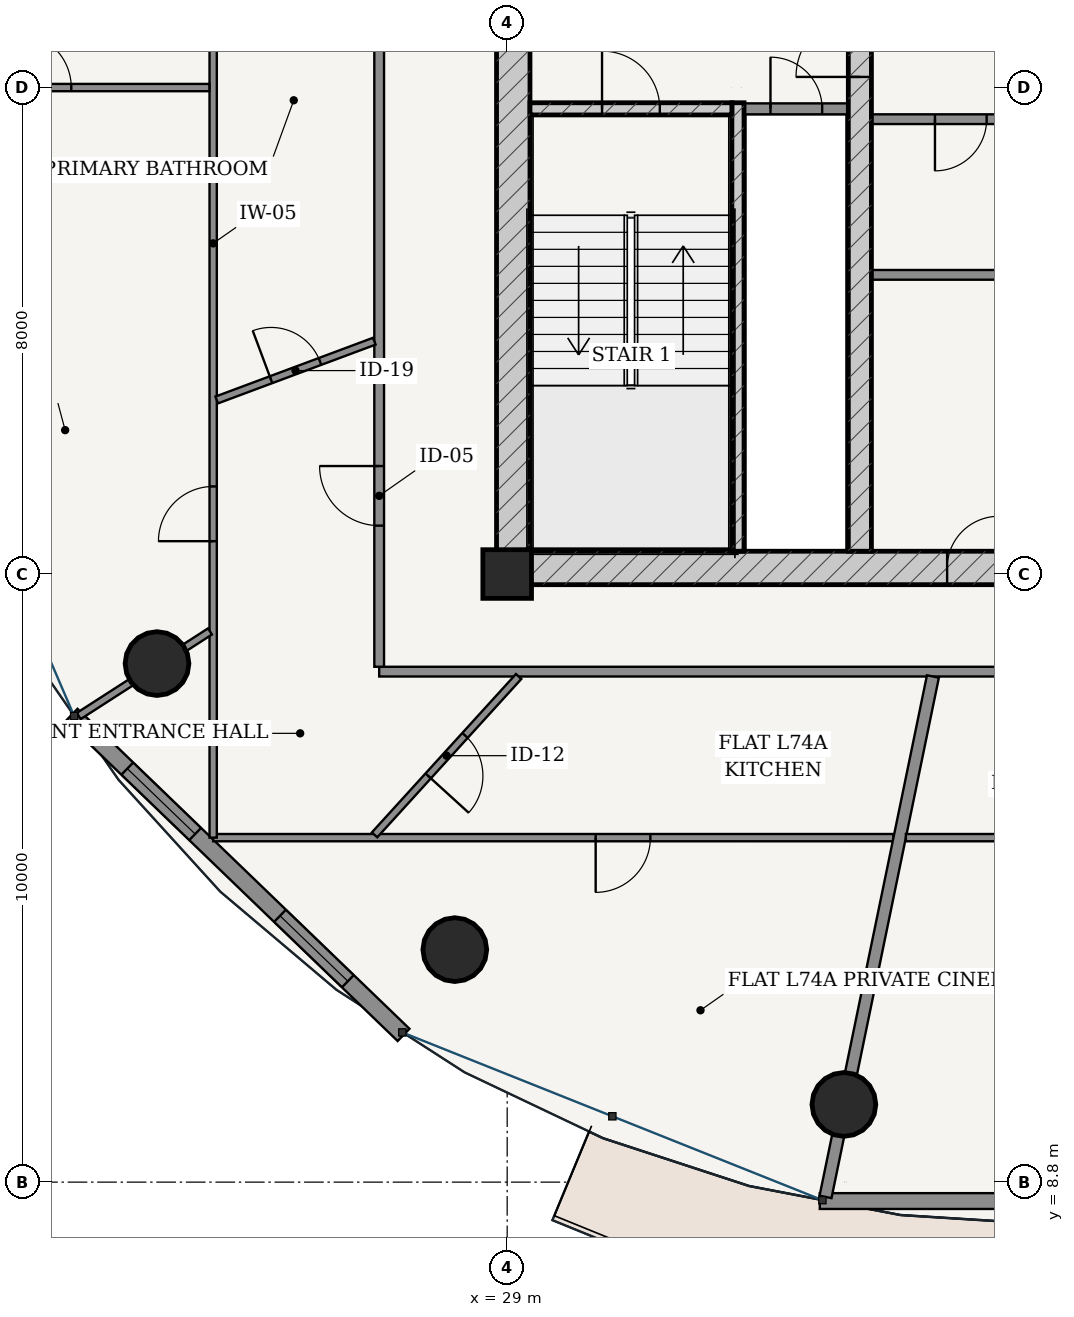
"""IFC4 building model, lengths in metres.
Left out: names, types, materials, properties, quantities, classifications, styles, units other than length and angle.
Written with IfcOpenShell. Run it as: python <this file> out.ifc"""

import sys

from ifc_helpers import new_model, si_unit, direction, frame, frame_2d, origin, origin_2d, place, context, subcontext, project, spatial, rectangle, hollow_circle, extrude, source, transform, mapped, element, fill, save


model = new_model("IFC4")
c1 = context("Model", 3, precision=1e-05, world=origin(), true_north=direction((-0.2419218956, 0.970295726276)))
c2 = subcontext(c1, "Body", "Model", "MODEL_VIEW")
j1 = project(units=[si_unit("LENGTHUNIT", "METRE"), si_unit("PLANEANGLEUNIT", "RADIAN")], contexts=[c1])
p1 = place(None, origin())
s1 = spatial("IfcSite", under=j1, at=p1, CompositionType="ELEMENT")
p2 = place(p1, origin())
s2 = spatial("IfcBuilding", under=s1, at=p2, CompositionType="ELEMENT")
p3 = place(p2, frame((0.0, 0.0, 281.95)))
s3 = spatial("IfcBuildingStorey", under=s2, at=p3, CompositionType="ELEMENT", Elevation=281.95)
p4 = place(p3, frame((29.0, 18.8, 0.0), z_axis=(0.0, 0.0, 1.0), x_axis=(1.0, 0.0, 0.0)))
e1 = element("IfcColumn", 1, at=p4, inside=s3, PredefinedType="COLUMN", context=c2, shape_type="SweptSolid", body=[
    extrude(rectangle(XDim=0.8, YDim=0.8, at=origin_2d()), origin(), (0.0, 0.0, 1.0), 3.75),
])
p5 = place(p3, frame((28.825, 18.9, 0.0), z_axis=(0.0, 0.0, 1.0), x_axis=(1.0, 0.0, 0.0)))
e2 = element("IfcWall", 2, at=p5, inside=s3, PredefinedType="SHEAR", context=c2, shape_type="SweptSolid", body=[
    extrude(rectangle(XDim=18.35, YDim=0.55, at=frame_2d((9.175, 0.0))), origin(), (0.0, 0.0, 1.0), 3.49),
])
p6 = place(p5, frame((7.41, 0.0, 0.0)))
e3 = element("IfcOpeningElement", 3, at=p6, cuts=e2, PredefinedType="OPENING", context=c2, shape_type="SweptSolid", body=[
    extrude(rectangle(XDim=0.85, YDim=2.1, at=frame_2d((0.425, 1.05))), frame((0.0, 0.285, 0.0), z_axis=(0.0, -1.0, 0.0), x_axis=(1.0, 0.0, 0.0)), (0.0, 0.0, 1.0), 0.57),
])
p7 = place(p5, frame((10.49, 0.0, 0.0)))
e4 = element("IfcOpeningElement", 4, at=p7, cuts=e2, PredefinedType="OPENING", context=c2, shape_type="SweptSolid", body=[
    extrude(rectangle(XDim=0.85, YDim=2.1, at=frame_2d((0.425, 1.05))), frame((0.0, 0.285, 0.0), z_axis=(0.0, -1.0, 0.0), x_axis=(1.0, 0.0, 0.0)), (0.0, 0.0, 1.0), 0.57),
])
p8 = place(p3, frame((29.1, 19.175, 0.0), z_axis=(0.0, 0.0, 1.0), x_axis=(0.0, 1.0, 0.0)))
e5 = element("IfcWall", 5, at=p8, inside=s3, PredefinedType="SHEAR", context=c2, shape_type="SweptSolid", body=[
    extrude(rectangle(XDim=15.25, YDim=0.55, at=frame_2d((7.625, 0.0))), origin(), (0.0, 0.0, 1.0), 3.49),
])
p9 = place(p8, frame((9.875, 0.0, 0.0)))
e6 = element("IfcOpeningElement", 6, at=p9, cuts=e5, PredefinedType="OPENING", context=c2, shape_type="SweptSolid", body=[
    extrude(rectangle(XDim=1.5, YDim=2.2, at=frame_2d((0.75, 1.1))), frame((0.0, 0.285, 0.0), z_axis=(0.0, -1.0, 0.0), x_axis=(1.0, 0.0, 0.0)), (0.0, 0.0, 1.0), 0.57),
])
p10 = place(p3, frame((32.795, 19.175, 0.0), z_axis=(0.0, 0.0, 1.0), x_axis=(0.0, 1.0, 0.0)))
e7 = element("IfcWall", 7, at=p10, inside=s3, PredefinedType="SOLIDWALL", context=c2, shape_type="SweptSolid", body=[
    extrude(rectangle(XDim=7.375, YDim=0.2, at=frame_2d((3.688, 0.0))), origin(), (0.0, 0.0, 1.0), 3.49),
])
p11 = place(p3, frame((29.375, 26.45, 0.0), z_axis=(0.0, 0.0, 1.0), x_axis=(1.0, 0.0, 0.0)))
e8 = element("IfcWall", 8, at=p11, inside=s3, PredefinedType="SOLIDWALL", context=c2, shape_type="SweptSolid", body=[
    extrude(rectangle(XDim=3.32, YDim=0.2, at=frame_2d((1.66, 0.0))), origin(), (0.0, 0.0, 1.0), 3.49),
])
p12 = place(p11, frame((1.185, 0.0, 0.0)))
e9 = element("IfcOpeningElement", 9, at=p12, cuts=e8, PredefinedType="OPENING", context=c2, shape_type="SweptSolid", body=[
    extrude(rectangle(XDim=0.95, YDim=2.15, at=frame_2d((0.475, 1.075))), frame((0.0, 0.11, 0.0), z_axis=(0.0, -1.0, 0.0), x_axis=(1.0, 0.0, 0.0)), (0.0, 0.0, 1.0), 0.22),
])
p13 = place(p3, frame((34.8, 19.175, 0.0), z_axis=(0.0, 0.0, 1.0), x_axis=(0.0, 1.0, 0.0)))
e10 = element("IfcWall", 10, at=p13, inside=s3, PredefinedType="SHEAR", context=c2, shape_type="SweptSolid", body=[
    extrude(rectangle(XDim=15.25, YDim=0.38, at=frame_2d((7.625, 0.0))), origin(), (0.0, 0.0, 1.0), 3.49),
])
p14 = place(p13, frame((7.8, 0.0, 0.0)))
e11 = element("IfcOpeningElement", 11, at=p14, cuts=e10, PredefinedType="OPENING", context=c2, shape_type="SweptSolid", body=[
    extrude(rectangle(XDim=1.05, YDim=2.15, at=frame_2d((0.525, 1.075))), frame((0.0, 0.2, 0.0), z_axis=(0.0, -1.0, 0.0), x_axis=(1.0, 0.0, 0.0)), (0.0, 0.0, 1.0), 0.4),
])
for number, where, z_axis, x_axis in (
    (12, (23.241, 17.328, 0.0), (0.0, 0.0, 1.0), (1.0, 0.0, 0.0)),
    (13, (28.139, 12.624, 0.0), (0.0, 0.0, 1.0), (1.0, 0.0, 0.0)),
    (14, (34.537, 10.078, 0.0), (0.0, 0.0, 1.0), (1.0, 0.0, 0.0)),
):
    element("IfcColumn", number, at=place(p3, frame(where, z_axis=z_axis, x_axis=x_axis)), inside=s3, PredefinedType="COLUMN", context=c2, shape_type="SweptSolid", body=[
        extrude(hollow_circle(Radius=0.525, WallThickness=0.035, at=origin_2d()), origin(), (0.0, 0.0, 1.0), 3.75),
    ])
p15 = place(p3, frame((21.837, 16.483, 0.0), z_axis=(0.0, 0.0, 1.0), x_axis=(0.719995397366, -0.69397883813, 0.0)))
e15 = element("IfcWall", 15, at=p15, inside=s3, PredefinedType="SOLIDWALL", context=c2, shape_type="SweptSolid", body=[
    extrude(rectangle(XDim=7.582, YDim=0.28, at=frame_2d((3.791, 0.0))), origin(), (0.0, 0.0, 1.0), 3.49),
])
p16 = place(p15, frame((1.272, 0.0, 0.85)))
e16 = element("IfcOpeningElement", 16, at=p16, cuts=e15, PredefinedType="OPENING", context=c2, shape_type="SweptSolid", body=[
    extrude(rectangle(XDim=1.55, YDim=1.95, at=frame_2d((0.775, 0.975))), frame((0.0, 0.15, 0.0), z_axis=(0.0, -1.0, 0.0), x_axis=(1.0, 0.0, 0.0)), (0.0, 0.0, 1.0), 0.3),
])
p17 = place(p15, frame((4.76, 0.0, 0.85)))
e17 = element("IfcOpeningElement", 17, at=p17, cuts=e15, PredefinedType="OPENING", context=c2, shape_type="SweptSolid", body=[
    extrude(rectangle(XDim=1.55, YDim=1.95, at=frame_2d((0.775, 0.975))), frame((0.0, 0.15, 0.0), z_axis=(0.0, -1.0, 0.0), x_axis=(1.0, 0.0, 0.0)), (0.0, 0.0, 1.0), 0.3),
])
p18 = place(p3, frame((34.141, 8.489, 0.0), z_axis=(0.0, 0.0, 1.0), x_axis=(1.0, 0.0, 0.0)))
e18 = element("IfcWall", 18, at=p18, inside=s3, PredefinedType="SOLIDWALL", context=c2, shape_type="SweptSolid", body=[
    extrude(rectangle(XDim=7.718, YDim=0.26, at=frame_2d((3.859, 0.0))), origin(), (0.0, 0.0, 1.0), 3.49),
])
p19 = place(p18, frame((3.184, 0.0, 0.0)))
e19 = element("IfcOpeningElement", 19, at=p19, cuts=e18, PredefinedType="OPENING", context=c2, shape_type="SweptSolid", body=[
    extrude(rectangle(XDim=1.35, YDim=2.2, at=frame_2d((0.675, 1.1))), frame((0.0, 0.14, 0.0), z_axis=(0.0, -1.0, 0.0), x_axis=(1.0, 0.0, 0.0)), (0.0, 0.0, 1.0), 0.28),
])
p20 = place(p3, frame((32.9, 26.45, 0.0), z_axis=(0.0, 0.0, 1.0), x_axis=(1.0, 0.0, 0.0)))
e20 = element("IfcWall", 20, at=p20, inside=s3, PredefinedType="PARTITIONING", context=c2, shape_type="SweptSolid", body=[
    extrude(rectangle(XDim=1.71, YDim=0.18, at=frame_2d((0.855, 0.0))), origin(), (0.0, 0.0, 1.0), 3.49),
])
p21 = place(p20, frame((0.43, 0.0, 0.0)))
e21 = element("IfcOpeningElement", 21, at=p21, cuts=e20, PredefinedType="OPENING", context=c2, shape_type="SweptSolid", body=[
    extrude(rectangle(XDim=0.85, YDim=2.1, at=frame_2d((0.425, 1.05))), frame((0.0, 0.1, 0.0), z_axis=(0.0, -1.0, 0.0), x_axis=(1.0, 0.0, 0.0)), (0.0, 0.0, 1.0), 0.2),
])
p22 = place(p3, frame((34.99, 26.28, 0.0), z_axis=(0.0, 0.0, 1.0), x_axis=(1.0, 0.0, 0.0)))
e22 = element("IfcWall", 22, at=p22, inside=s3, PredefinedType="PARTITIONING", context=c2, shape_type="SweptSolid", body=[
    extrude(rectangle(XDim=6.02, YDim=0.16, at=frame_2d((3.01, 0.0))), origin(), (0.0, 0.0, 1.0), 3.49),
])
p23 = place(p22, frame((1.045, 0.0, 0.0)))
e23 = element("IfcOpeningElement", 23, at=p23, cuts=e22, PredefinedType="OPENING", context=c2, shape_type="SweptSolid", body=[
    extrude(rectangle(XDim=0.85, YDim=2.1, at=frame_2d((0.425, 1.05))), frame((0.0, 0.09, 0.0), z_axis=(0.0, -1.0, 0.0), x_axis=(1.0, 0.0, 0.0)), (0.0, 0.0, 1.0), 0.18),
])
p24 = place(p22, frame((3.215, 0.0, 0.0)))
e24 = element("IfcOpeningElement", 24, at=p24, cuts=e22, PredefinedType="OPENING", context=c2, shape_type="SweptSolid", body=[
    extrude(rectangle(XDim=1.1, YDim=2.2, at=frame_2d((0.55, 1.1))), frame((0.0, 0.09, 0.0), z_axis=(0.0, -1.0, 0.0), x_axis=(1.0, 0.0, 0.0)), (0.0, 0.0, 1.0), 0.18),
])
p25 = place(p22, frame((4.695, 0.0, 0.0)))
e25 = element("IfcOpeningElement", 25, at=p25, cuts=e22, PredefinedType="OPENING", context=c2, shape_type="SweptSolid", body=[
    extrude(rectangle(XDim=1.1, YDim=2.2, at=frame_2d((0.55, 1.1))), frame((0.0, 0.09, 0.0), z_axis=(0.0, -1.0, 0.0), x_axis=(1.0, 0.0, 0.0)), (0.0, 0.0, 1.0), 0.18),
])
p26 = place(p3, frame((34.99, 23.72, 0.0), z_axis=(0.0, 0.0, 1.0), x_axis=(1.0, 0.0, 0.0)))
e26 = element("IfcWall", 26, at=p26, inside=s3, PredefinedType="PARTITIONING", context=c2, shape_type="SweptSolid", body=[
    extrude(rectangle(XDim=6.02, YDim=0.16, at=frame_2d((3.01, 0.0))), origin(), (0.0, 0.0, 1.0), 3.49),
])
p27 = place(p3, frame((26.895, 17.195, 0.0), z_axis=(0.0, 0.0, 1.0), x_axis=(1.0, 0.0, 0.0)))
e27 = element("IfcWall", 27, at=p27, inside=s3, PredefinedType="PARTITIONING", context=c2, shape_type="SweptSolid", body=[
    extrude(rectangle(XDim=22.21, YDim=0.16, at=frame_2d((11.105, 0.0))), origin(), (0.0, 0.0, 1.0), 3.015),
])
p28 = place(p27, frame((17.365, 0.0, 0.0)))
e28 = element("IfcOpeningElement", 28, at=p28, cuts=e27, PredefinedType="OPENING", context=c2, shape_type="SweptSolid", body=[
    extrude(rectangle(XDim=0.98, YDim=2.2, at=frame_2d((0.49, 1.1))), frame((0.0, 0.09, 0.0), z_axis=(0.0, -1.0, 0.0), x_axis=(1.0, 0.0, 0.0)), (0.0, 0.0, 1.0), 0.18),
])
p29 = place(p3, frame((26.895, 17.275, 0.0), z_axis=(0.0, 0.0, 1.0), x_axis=(0.0, 1.0, 0.0)))
e29 = element("IfcWall", 29, at=p29, inside=s3, PredefinedType="PARTITIONING", context=c2, shape_type="SweptSolid", body=[
    extrude(rectangle(XDim=13.925, YDim=0.16, at=frame_2d((6.962, 0.0))), origin(), (0.0, 0.0, 1.0), 3.015),
])
p30 = place(p29, frame((2.321, 0.0, 0.0)))
e30 = element("IfcOpeningElement", 30, at=p30, cuts=e29, PredefinedType="OPENING", context=c2, shape_type="SweptSolid", body=[
    extrude(rectangle(XDim=0.98, YDim=2.2, at=frame_2d((0.49, 1.1))), frame((0.0, 0.09, 0.0), z_axis=(0.0, -1.0, 0.0), x_axis=(1.0, 0.0, 0.0)), (0.0, 0.0, 1.0), 0.18),
])
p31 = place(p3, frame((35.353, 14.465, 0.0), z_axis=(0.0, 0.0, 1.0), x_axis=(-1.0, 0.0, 0.0)))
e31 = element("IfcWall", 31, at=p31, inside=s3, PredefinedType="PARTITIONING", context=c2, shape_type="SweptSolid", body=[
    extrude(rectangle(XDim=11.188, YDim=0.12, at=frame_2d((5.594, 0.0))), origin(), (0.0, 0.0, 1.0), 3.015),
])
p32 = place(p31, frame((3.997, 0.0, 0.0)))
e32 = element("IfcOpeningElement", 32, at=p32, cuts=e31, PredefinedType="OPENING", context=c2, shape_type="SweptSolid", body=[
    extrude(rectangle(XDim=0.9, YDim=2.15, at=frame_2d((0.45, 1.075))), frame((0.0, 0.07, 0.0), z_axis=(0.0, -1.0, 0.0), x_axis=(1.0, 0.0, 0.0)), (0.0, 0.0, 1.0), 0.14),
])
p33 = place(p3, frame((24.165, 14.465, 0.0), z_axis=(0.0, 0.0, 1.0), x_axis=(0.0, 1.0, 0.0)))
e33 = element("IfcWall", 33, at=p33, inside=s3, PredefinedType="PARTITIONING", context=c2, shape_type="SweptSolid", body=[
    extrude(rectangle(XDim=19.545, YDim=0.12, at=frame_2d((9.772, 0.0))), origin(), (0.0, 0.0, 1.0), 3.015),
])
p34 = place(p33, frame((4.875, 0.0, 0.0)))
e34 = element("IfcOpeningElement", 34, at=p34, cuts=e33, PredefinedType="OPENING", context=c2, shape_type="SweptSolid", body=[
    extrude(rectangle(XDim=0.9, YDim=2.15, at=frame_2d((0.45, 1.075))), frame((0.0, 0.07, 0.0), z_axis=(0.0, -1.0, 0.0), x_axis=(1.0, 0.0, 0.0)), (0.0, 0.0, 1.0), 0.14),
])
p35 = place(p33, frame((16.61, 0.0, 0.0)))
e35 = element("IfcOpeningElement", 35, at=p35, cuts=e33, PredefinedType="OPENING", context=c2, shape_type="SweptSolid", body=[
    extrude(rectangle(XDim=0.9, YDim=2.15, at=frame_2d((0.45, 1.075))), frame((0.0, 0.07, 0.0), z_axis=(0.0, -1.0, 0.0), x_axis=(1.0, 0.0, 0.0)), (0.0, 0.0, 1.0), 0.14),
])
p36 = place(p3, frame((24.103, 26.8, 0.0), z_axis=(0.0, 0.0, 1.0), x_axis=(-1.0, 0.0, 0.0)))
e36 = element("IfcWall", 36, at=p36, inside=s3, PredefinedType="PARTITIONING", context=c2, shape_type="SweptSolid", body=[
    extrude(rectangle(XDim=5.443, YDim=0.12, at=frame_2d((2.722, 0.0))), origin(), (0.0, 0.0, 1.0), 3.121),
])
p37 = place(p36, frame((2.271, 0.0, 0.0)))
e37 = element("IfcOpeningElement", 37, at=p37, cuts=e36, PredefinedType="OPENING", context=c2, shape_type="SweptSolid", body=[
    extrude(rectangle(XDim=0.9, YDim=2.15, at=frame_2d((0.45, 1.075))), frame((0.0, 0.07, 0.0), z_axis=(0.0, -1.0, 0.0), x_axis=(1.0, 0.0, 0.0)), (0.0, 0.0, 1.0), 0.14),
])
p38 = place(p3, frame((24.113, 17.856, 0.0), z_axis=(0.0, 0.0, 1.0), x_axis=(-0.840708587197, -0.54148783127, 0.0)))
e38 = element("IfcWall", 38, at=p38, inside=s3, PredefinedType="PARTITIONING", context=c2, shape_type="SweptSolid", body=[
    extrude(rectangle(XDim=2.568, YDim=0.12, at=frame_2d((1.284, 0.0))), origin(), (0.0, 0.0, 1.0), 3.015),
])
p39 = place(p3, frame((26.815, 22.629, 0.0), z_axis=(0.0, 0.0, 1.0), x_axis=(-0.93696600231, -0.349420535338, 0.0)))
e39 = element("IfcWall", 39, at=p39, inside=s3, PredefinedType="PARTITIONING", context=c2, shape_type="SweptSolid", body=[
    extrude(rectangle(XDim=2.766, YDim=0.12, at=frame_2d((1.383, 0.0))), origin(), (0.0, 0.0, 1.0), 3.209),
])
p40 = place(p39, frame((0.953, 0.0, 0.0)))
e40 = element("IfcOpeningElement", 40, at=p40, cuts=e39, PredefinedType="OPENING", context=c2, shape_type="SweptSolid", body=[
    extrude(rectangle(XDim=0.86, YDim=2.15, at=frame_2d((0.43, 1.075))), frame((0.0, 0.07, 0.0), z_axis=(0.0, -1.0, 0.0), x_axis=(1.0, 0.0, 0.0)), (0.0, 0.0, 1.0), 0.14),
])
p41 = place(p3, frame((29.188, 17.115, 0.0), z_axis=(0.0, 0.0, 1.0), x_axis=(-0.67292817107, -0.739707831904, 0.0)))
e41 = element("IfcWall", 41, at=p41, inside=s3, PredefinedType="PARTITIONING", context=c2, shape_type="SweptSolid", body=[
    extrude(rectangle(XDim=3.521, YDim=0.12, at=frame_2d((1.76, 0.0))), origin(), (0.0, 0.0, 1.0), 3.015),
])
p42 = place(p41, frame((1.31, 0.0, 0.0)))
e42 = element("IfcOpeningElement", 42, at=p42, cuts=e41, PredefinedType="OPENING", context=c2, shape_type="SweptSolid", body=[
    extrude(rectangle(XDim=0.9, YDim=2.15, at=frame_2d((0.45, 1.075))), frame((0.0, 0.07, 0.0), z_axis=(0.0, -1.0, 0.0), x_axis=(1.0, 0.0, 0.0)), (0.0, 0.0, 1.0), 0.14),
])
p43 = place(p3, frame((36.001, 17.115, 0.0), z_axis=(0.0, 0.0, 1.0), x_axis=(-0.202108543081, -0.979363128167, 0.0)))
e43 = element("IfcWall", 43, at=p43, inside=s3, PredefinedType="PARTITIONING", context=c2, shape_type="SweptSolid", body=[
    extrude(rectangle(XDim=8.739, YDim=0.2, at=frame_2d((4.369, 0.0))), origin(), (0.0, 0.0, 1.0), 3.015),
])
p44 = place(p3, frame((51.835, 14.465, 0.0), z_axis=(0.0, 0.0, 1.0), x_axis=(-1.0, 0.0, 0.0)))
e44 = element("IfcWall", 44, at=p44, inside=s3, PredefinedType="PARTITIONING", context=c2, shape_type="SweptSolid", body=[
    extrude(rectangle(XDim=16.278, YDim=0.12, at=frame_2d((8.139, 0.0))), origin(), (0.0, 0.0, 1.0), 3.015),
])
p45 = place(p44, frame((4.996, 0.0, 0.0)))
e45 = element("IfcOpeningElement", 45, at=p45, cuts=e44, PredefinedType="OPENING", context=c2, shape_type="SweptSolid", body=[
    extrude(rectangle(XDim=0.9, YDim=2.15, at=frame_2d((0.45, 1.075))), frame((0.0, 0.07, 0.0), z_axis=(0.0, -1.0, 0.0), x_axis=(1.0, 0.0, 0.0)), (0.0, 0.0, 1.0), 0.14),
])
m1 = source(origin(), c2, "Body", "SweptSolid", [
    extrude(rectangle(XDim=1.55, YDim=1.95, at=frame_2d((0.775, 0.975))), frame((0.0, 0.03, 0.0), z_axis=(0.0, -1.0, 0.0), x_axis=(1.0, 0.0, 0.0)), (0.0, 0.0, 1.0), 0.06),
])
p46 = place(p16, origin())
e46 = element("IfcWindow", 46, at=p46, inside=s3, PartitioningType="SINGLE_PANEL", PredefinedType="WINDOW", context=c2, shape_type="MappedRepresentation", body=[
    mapped(m1, transform((0.0, 0.0, 0.0), scale=1.0)),
])
fill(e16, e46)
p47 = place(p17, origin())
e47 = element("IfcWindow", 47, at=p47, inside=s3, PartitioningType="SINGLE_PANEL", PredefinedType="WINDOW", context=c2, shape_type="MappedRepresentation", body=[
    mapped(m1, transform((0.0, 0.0, 0.0), scale=1.0)),
])
fill(e17, e47)
m2 = source(origin(), c2, "Body", "SweptSolid", [
    extrude(rectangle(XDim=1.05, YDim=2.15, at=frame_2d((0.525, 1.075))), frame((0.0, 0.025, 0.0), z_axis=(0.0, -1.0, 0.0), x_axis=(1.0, 0.0, 0.0)), (0.0, 0.0, 1.0), 0.05),
])
p48 = place(p14, origin())
e48 = element("IfcDoor", 48, at=p48, inside=s3, OperationType="SINGLE_SWING_LEFT", PredefinedType="DOOR", context=c2, shape_type="MappedRepresentation", body=[
    mapped(m2, transform((0.0, 0.0, 0.0), scale=1.0)),
])
fill(e11, e48)
m3 = source(origin(), c2, "Body", "SweptSolid", [
    extrude(rectangle(XDim=0.95, YDim=2.15, at=frame_2d((0.475, 1.075))), frame((0.0, 0.025, 0.0), z_axis=(0.0, -1.0, 0.0), x_axis=(1.0, 0.0, 0.0)), (0.0, 0.0, 1.0), 0.05),
])
p49 = place(p12, origin())
e49 = element("IfcDoor", 49, at=p49, inside=s3, OperationType="SINGLE_SWING_LEFT", PredefinedType="DOOR", context=c2, shape_type="MappedRepresentation", body=[
    mapped(m3, transform((0.0, 0.0, 0.0), scale=1.0)),
])
fill(e9, e49)
m4 = source(origin(), c2, "Body", "SweptSolid", [
    extrude(rectangle(XDim=0.85, YDim=2.1, at=frame_2d((0.425, 1.05))), frame((0.0, 0.025, 0.0), z_axis=(0.0, -1.0, 0.0), x_axis=(1.0, 0.0, 0.0)), (0.0, 0.0, 1.0), 0.05),
])
p50 = place(p21, origin())
e50 = element("IfcDoor", 50, at=p50, inside=s3, OperationType="SINGLE_SWING_LEFT", PredefinedType="DOOR", context=c2, shape_type="MappedRepresentation", body=[
    mapped(m4, transform((0.0, 0.0, 0.0), scale=1.0)),
])
fill(e21, e50)
p51 = place(p23, frame((0.85, 0.0, 0.0), z_axis=(0.0, 0.0, 1.0), x_axis=(-1.0, 0.0, 0.0)))
e51 = element("IfcDoor", 51, at=p51, inside=s3, OperationType="SINGLE_SWING_RIGHT", PredefinedType="DOOR", context=c2, shape_type="MappedRepresentation", body=[
    mapped(m4, transform((0.0, 0.0, 0.0), scale=1.0)),
])
fill(e23, e51)
p52 = place(p6, origin())
e52 = element("IfcDoor", 52, at=p52, inside=s3, OperationType="SINGLE_SWING_RIGHT", PredefinedType="DOOR", context=c2, shape_type="MappedRepresentation", body=[
    mapped(m4, transform((0.0, 0.0, 0.0), scale=1.0)),
])
fill(e3, e52)
m5 = source(origin(), c2, "Body", "SweptSolid", [
    extrude(rectangle(XDim=0.98, YDim=2.2, at=frame_2d((0.49, 1.1))), frame((0.0, 0.025, 0.0), z_axis=(0.0, -1.0, 0.0), x_axis=(1.0, 0.0, 0.0)), (0.0, 0.0, 1.0), 0.05),
])
p53 = place(p30, origin())
e53 = element("IfcDoor", 53, at=p53, inside=s3, OperationType="SINGLE_SWING_RIGHT", PredefinedType="DOOR", context=c2, shape_type="MappedRepresentation", body=[
    mapped(m5, transform((0.0, 0.0, 0.0), scale=1.0)),
])
fill(e30, e53)
m6 = source(origin(), c2, "Body", "SweptSolid", [
    extrude(rectangle(XDim=0.86, YDim=2.15, at=frame_2d((0.43, 1.075))), frame((0.0, 0.025, 0.0), z_axis=(0.0, -1.0, 0.0), x_axis=(1.0, 0.0, 0.0)), (0.0, 0.0, 1.0), 0.05),
])
p54 = place(p40, frame((0.86, 0.0, 0.0), z_axis=(0.0, 0.0, 1.0), x_axis=(-1.0, 0.0, 0.0)))
e54 = element("IfcDoor", 54, at=p54, inside=s3, OperationType="SINGLE_SWING_LEFT", PredefinedType="DOOR", context=c2, shape_type="MappedRepresentation", body=[
    mapped(m6, transform((0.0, 0.0, 0.0), scale=1.0)),
])
fill(e40, e54)
m7 = source(origin(), c2, "Body", "SweptSolid", [
    extrude(rectangle(XDim=0.9, YDim=2.15, at=frame_2d((0.45, 1.075))), frame((0.0, 0.025, 0.0), z_axis=(0.0, -1.0, 0.0), x_axis=(1.0, 0.0, 0.0)), (0.0, 0.0, 1.0), 0.05),
])
p55 = place(p42, origin())
e55 = element("IfcDoor", 55, at=p55, inside=s3, OperationType="SINGLE_SWING_RIGHT", PredefinedType="DOOR", context=c2, shape_type="MappedRepresentation", body=[
    mapped(m7, transform((0.0, 0.0, 0.0), scale=1.0)),
])
fill(e42, e55)
p56 = place(p34, origin())
e56 = element("IfcDoor", 56, at=p56, inside=s3, OperationType="SINGLE_SWING_LEFT", PredefinedType="DOOR", context=c2, shape_type="MappedRepresentation", body=[
    mapped(m7, transform((0.0, 0.0, 0.0), scale=1.0)),
])
fill(e34, e56)
p57 = place(p32, origin())
e57 = element("IfcDoor", 57, at=p57, inside=s3, OperationType="SINGLE_SWING_RIGHT", PredefinedType="DOOR", context=c2, shape_type="MappedRepresentation", body=[
    mapped(m7, transform((0.0, 0.0, 0.0), scale=1.0)),
])
fill(e32, e57)
p58 = place(p37, frame((0.9, 0.0, 0.0), z_axis=(0.0, 0.0, 1.0), x_axis=(-1.0, 0.0, 0.0)))
e58 = element("IfcDoor", 58, at=p58, inside=s3, OperationType="SINGLE_SWING_LEFT", PredefinedType="DOOR", context=c2, shape_type="MappedRepresentation", body=[
    mapped(m7, transform((0.0, 0.0, 0.0), scale=1.0)),
])
fill(e37, e58)
save(model, sys.argv[1])
